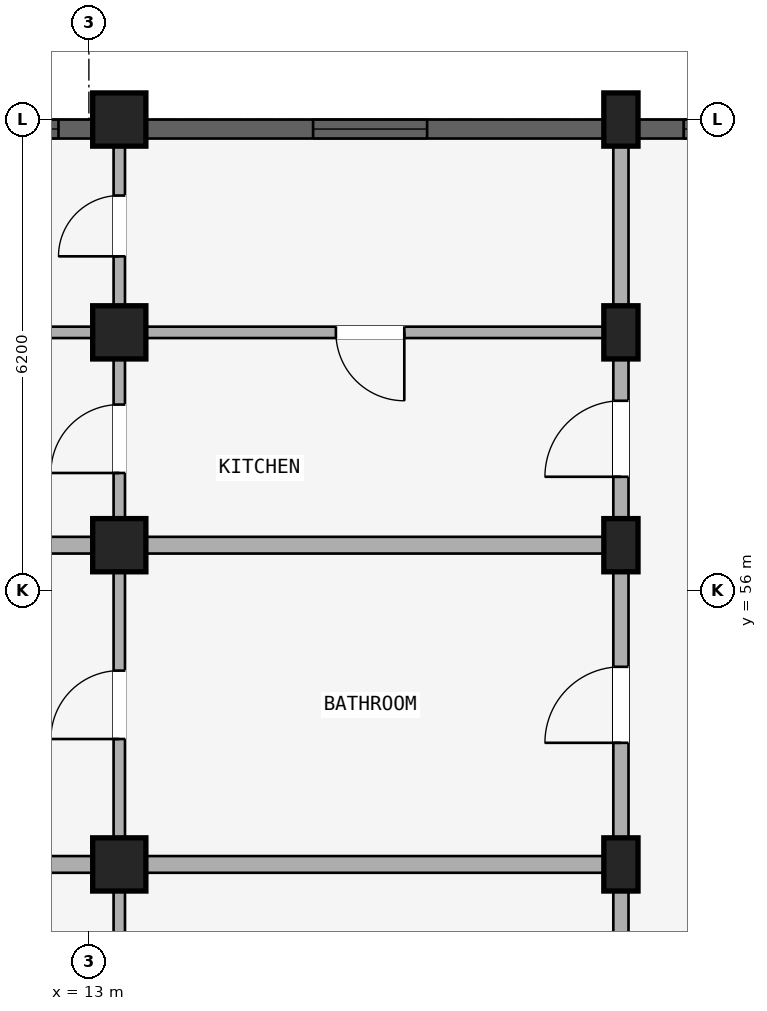
"""IFC4 building model, lengths in metres.
Left out: names, types, materials, properties, quantities, classifications, styles, units other than length and angle.
Written with IfcOpenShell. Run it as: python <this file> out.ifc"""

import sys

from ifc_helpers import new_model, si_unit, direction, frame, frame_2d, origin, origin_2d, place, context, subcontext, project, spatial, rectangle, extrude, element, fill, save


model = new_model("IFC4")
c1 = context("Model", 3, precision=1e-05, world=origin(), true_north=direction((0.0, 1.0)))
c2 = subcontext(c1, "Body", "Model", "MODEL_VIEW")
j1 = project(units=[si_unit("LENGTHUNIT", "METRE"), si_unit("PLANEANGLEUNIT", "RADIAN")], contexts=[c1])
p1 = place(None, origin())
s1 = spatial("IfcSite", under=j1, at=p1, CompositionType="ELEMENT")
p2 = place(p1, origin())
s2 = spatial("IfcBuilding", under=s1, at=p2, CompositionType="ELEMENT")
p3 = place(p2, frame((0.0, 0.0, 18.15)))
s3 = spatial("IfcBuildingStorey", under=s2, at=p3, CompositionType="ELEMENT", Elevation=18.15)
p4 = place(p3, frame((20.0, 52.4, 0.0), z_axis=(0.0, 0.0, 1.0), x_axis=(1.0, 0.0, 0.0)))
e1 = element("IfcColumn", 1, at=p4, inside=s3, PredefinedType="COLUMN", context=c2, shape_type="SweptSolid", body=[
    extrude(rectangle(XDim=0.45, YDim=0.7, at=origin_2d()), origin(), (0.0, 0.0, 1.0), 2.93),
])
p5 = place(p3, frame((13.4, 52.4, 0.0), z_axis=(0.0, 0.0, 1.0), x_axis=(1.0, 0.0, 0.0)))
e2 = element("IfcColumn", 2, at=p5, inside=s3, PredefinedType="COLUMN", context=c2, shape_type="SweptSolid", body=[
    extrude(rectangle(XDim=0.7, YDim=0.7, at=origin_2d()), origin(), (0.0, 0.0, 1.0), 2.93),
])
p6 = place(p3, frame((20.0, 56.6, 0.0), z_axis=(0.0, 0.0, 1.0), x_axis=(1.0, 0.0, 0.0)))
e3 = element("IfcColumn", 3, at=p6, inside=s3, PredefinedType="COLUMN", context=c2, shape_type="SweptSolid", body=[
    extrude(rectangle(XDim=0.45, YDim=0.7, at=origin_2d()), origin(), (0.0, 0.0, 1.0), 2.93),
])
p7 = place(p3, frame((13.4, 56.6, 0.0), z_axis=(0.0, 0.0, 1.0), x_axis=(1.0, 0.0, 0.0)))
e4 = element("IfcColumn", 4, at=p7, inside=s3, PredefinedType="COLUMN", context=c2, shape_type="SweptSolid", body=[
    extrude(rectangle(XDim=0.7, YDim=0.7, at=origin_2d()), origin(), (0.0, 0.0, 1.0), 2.93),
])
p8 = place(p3, frame((20.0, 59.4, 0.0), z_axis=(0.0, 0.0, 1.0), x_axis=(1.0, 0.0, 0.0)))
e5 = element("IfcColumn", 5, at=p8, inside=s3, PredefinedType="COLUMN", context=c2, shape_type="SweptSolid", body=[
    extrude(rectangle(XDim=0.45, YDim=0.7, at=origin_2d()), origin(), (0.0, 0.0, 1.0), 2.93),
])
p9 = place(p3, frame((13.4, 59.4, 0.0), z_axis=(0.0, 0.0, 1.0), x_axis=(1.0, 0.0, 0.0)))
e6 = element("IfcColumn", 6, at=p9, inside=s3, PredefinedType="COLUMN", context=c2, shape_type="SweptSolid", body=[
    extrude(rectangle(XDim=0.7, YDim=0.7, at=origin_2d()), origin(), (0.0, 0.0, 1.0), 2.93),
])
p10 = place(p3, frame((20.0, 62.2, 0.0), z_axis=(0.0, 0.0, 1.0), x_axis=(1.0, 0.0, 0.0)))
e7 = element("IfcColumn", 7, at=p10, inside=s3, PredefinedType="COLUMN", context=c2, shape_type="SweptSolid", body=[
    extrude(rectangle(XDim=0.45, YDim=0.7, at=origin_2d()), origin(), (0.0, 0.0, 1.0), 2.93),
])
p11 = place(p3, frame((13.4, 62.2, 0.0), z_axis=(0.0, 0.0, 1.0), x_axis=(1.0, 0.0, 0.0)))
e8 = element("IfcColumn", 8, at=p11, inside=s3, PredefinedType="COLUMN", context=c2, shape_type="SweptSolid", body=[
    extrude(rectangle(XDim=0.7, YDim=0.7, at=origin_2d()), origin(), (0.0, 0.0, 1.0), 2.93),
])
p12 = place(p3, frame((20.0, 48.35, 0.0), z_axis=(0.0, 0.0, 1.0), x_axis=(0.0, 1.0, 0.0)))
e9 = element("IfcWall", 9, at=p12, inside=s3, PredefinedType="STANDARD", context=c2, shape_type="SweptSolid", body=[
    extrude(rectangle(XDim=4.05, YDim=0.2, at=frame_2d((2.025, 0.0))), origin(), (0.0, 0.0, 1.0), 2.372),
])
p13 = place(p12, frame((1.525, 0.0, 0.0)))
e10 = element("IfcOpeningElement", 10, at=p13, cuts=e9, PredefinedType="OPENING", context=c2, shape_type="SweptSolid", body=[
    extrude(rectangle(XDim=1.0, YDim=2.15, at=frame_2d((0.5, 1.075))), frame((0.0, 0.11, 0.0), z_axis=(0.0, -1.0, 0.0), x_axis=(1.0, 0.0, 0.0)), (0.0, 0.0, 1.0), 0.22),
])
p14 = place(p3, frame((13.4, 48.43, 0.0), z_axis=(0.0, 0.0, 1.0), x_axis=(0.0, 1.0, 0.0)))
e11 = element("IfcWall", 11, at=p14, inside=s3, PredefinedType="PARTITIONING", context=c2, shape_type="SweptSolid", body=[
    extrude(rectangle(XDim=3.89, YDim=0.15, at=frame_2d((1.945, 0.0))), origin(), (0.0, 0.0, 1.0), 2.372),
])
p15 = place(p14, frame((1.495, 0.0, 0.0)))
e12 = element("IfcOpeningElement", 12, at=p15, cuts=e11, PredefinedType="OPENING", context=c2, shape_type="SweptSolid", body=[
    extrude(rectangle(XDim=0.9, YDim=2.1, at=frame_2d((0.45, 1.05))), frame((0.0, 0.085, 0.0), z_axis=(0.0, -1.0, 0.0), x_axis=(1.0, 0.0, 0.0)), (0.0, 0.0, 1.0), 0.17),
])
p16 = place(p3, frame((20.0, 52.4, 0.0), z_axis=(0.0, 0.0, 1.0), x_axis=(0.0, 1.0, 0.0)))
e13 = element("IfcWall", 13, at=p16, inside=s3, PredefinedType="STANDARD", context=c2, shape_type="SweptSolid", body=[
    extrude(rectangle(XDim=4.2, YDim=0.2, at=frame_2d((2.1, 0.0))), origin(), (0.0, 0.0, 1.0), 2.372),
])
p17 = place(p16, frame((1.6, 0.0, 0.0)))
e14 = element("IfcOpeningElement", 14, at=p17, cuts=e13, PredefinedType="OPENING", context=c2, shape_type="SweptSolid", body=[
    extrude(rectangle(XDim=1.0, YDim=2.15, at=frame_2d((0.5, 1.075))), frame((0.0, 0.11, 0.0), z_axis=(0.0, -1.0, 0.0), x_axis=(1.0, 0.0, 0.0)), (0.0, 0.0, 1.0), 0.22),
])
p18 = place(p3, frame((13.4, 52.48, 0.0), z_axis=(0.0, 0.0, 1.0), x_axis=(0.0, 1.0, 0.0)))
e15 = element("IfcWall", 15, at=p18, inside=s3, PredefinedType="PARTITIONING", context=c2, shape_type="SweptSolid", body=[
    extrude(rectangle(XDim=4.04, YDim=0.15, at=frame_2d((2.02, 0.0))), origin(), (0.0, 0.0, 1.0), 2.372),
])
p19 = place(p18, frame((1.57, 0.0, 0.0)))
e16 = element("IfcOpeningElement", 16, at=p19, cuts=e15, PredefinedType="OPENING", context=c2, shape_type="SweptSolid", body=[
    extrude(rectangle(XDim=0.9, YDim=2.1, at=frame_2d((0.45, 1.05))), frame((0.0, 0.085, 0.0), z_axis=(0.0, -1.0, 0.0), x_axis=(1.0, 0.0, 0.0)), (0.0, 0.0, 1.0), 0.17),
])
p20 = place(p3, frame((19.95, 52.4, 0.0), z_axis=(0.0, 0.0, 1.0), x_axis=(-1.0, 0.0, 0.0)))
e17 = element("IfcWall", 17, at=p20, inside=s3, PredefinedType="STANDARD", context=c2, shape_type="SweptSolid", body=[
    extrude(rectangle(XDim=17.53, YDim=0.22, at=frame_2d((8.765, 0.0))), origin(), (0.0, 0.0, 1.0), 2.372),
])
p21 = place(p3, frame((20.0, 56.6, 0.0), z_axis=(0.0, 0.0, 1.0), x_axis=(0.0, 1.0, 0.0)))
e18 = element("IfcWall", 18, at=p21, inside=s3, PredefinedType="STANDARD", context=c2, shape_type="SweptSolid", body=[
    extrude(rectangle(XDim=2.8, YDim=0.2, at=frame_2d((1.4, 0.0))), origin(), (0.0, 0.0, 1.0), 2.372),
])
p22 = place(p21, frame((0.9, 0.0, 0.0)))
e19 = element("IfcOpeningElement", 19, at=p22, cuts=e18, PredefinedType="OPENING", context=c2, shape_type="SweptSolid", body=[
    extrude(rectangle(XDim=1.0, YDim=2.15, at=frame_2d((0.5, 1.075))), frame((0.0, 0.11, 0.0), z_axis=(0.0, -1.0, 0.0), x_axis=(1.0, 0.0, 0.0)), (0.0, 0.0, 1.0), 0.22),
])
p23 = place(p3, frame((13.4, 56.68, 0.0), z_axis=(0.0, 0.0, 1.0), x_axis=(0.0, 1.0, 0.0)))
e20 = element("IfcWall", 20, at=p23, inside=s3, PredefinedType="PLUMBINGWALL", context=c2, shape_type="SweptSolid", body=[
    extrude(rectangle(XDim=2.64, YDim=0.15, at=frame_2d((1.32, 0.0))), origin(), (0.0, 0.0, 1.0), 2.372),
])
p24 = place(p23, frame((0.87, 0.0, 0.0)))
e21 = element("IfcOpeningElement", 21, at=p24, cuts=e20, PredefinedType="OPENING", context=c2, shape_type="SweptSolid", body=[
    extrude(rectangle(XDim=0.9, YDim=2.1, at=frame_2d((0.45, 1.05))), frame((0.0, 0.085, 0.0), z_axis=(0.0, -1.0, 0.0), x_axis=(1.0, 0.0, 0.0)), (0.0, 0.0, 1.0), 0.17),
])
p25 = place(p3, frame((19.9, 56.6, 0.0), z_axis=(0.0, 0.0, 1.0), x_axis=(-1.0, 0.0, 0.0)))
e22 = element("IfcWall", 22, at=p25, inside=s3, PredefinedType="STANDARD", context=c2, shape_type="SweptSolid", body=[
    extrude(rectangle(XDim=17.42, YDim=0.22, at=frame_2d((8.71, 0.0))), origin(), (0.0, 0.0, 1.0), 2.372),
])
p26 = place(p3, frame((20.0, 59.4, 0.0), z_axis=(0.0, 0.0, 1.0), x_axis=(0.0, 1.0, 0.0)))
e23 = element("IfcWall", 23, at=p26, inside=s3, PredefinedType="STANDARD", context=c2, shape_type="SweptSolid", body=[
    extrude(rectangle(XDim=2.8, YDim=0.2, at=frame_2d((1.4, 0.0))), origin(), (0.0, 0.0, 1.0), 2.372),
])
p27 = place(p3, frame((13.4, 59.48, 0.0), z_axis=(0.0, 0.0, 1.0), x_axis=(0.0, 1.0, 0.0)))
e24 = element("IfcWall", 24, at=p27, inside=s3, PredefinedType="PLUMBINGWALL", context=c2, shape_type="SweptSolid", body=[
    extrude(rectangle(XDim=2.64, YDim=0.15, at=frame_2d((1.32, 0.0))), origin(), (0.0, 0.0, 1.0), 2.372),
])
p28 = place(p27, frame((0.92, 0.0, 0.0)))
e25 = element("IfcOpeningElement", 25, at=p28, cuts=e24, PredefinedType="OPENING", context=c2, shape_type="SweptSolid", body=[
    extrude(rectangle(XDim=0.8, YDim=2.1, at=frame_2d((0.4, 1.05))), frame((0.0, 0.085, 0.0), z_axis=(0.0, -1.0, 0.0), x_axis=(1.0, 0.0, 0.0)), (0.0, 0.0, 1.0), 0.17),
])
p29 = place(p3, frame((19.9, 59.4, 0.0), z_axis=(0.0, 0.0, 1.0), x_axis=(-1.0, 0.0, 0.0)))
e26 = element("IfcWall", 26, at=p29, inside=s3, PredefinedType="PARTITIONING", context=c2, shape_type="SweptSolid", body=[
    extrude(rectangle(XDim=17.42, YDim=0.15, at=frame_2d((8.71, 0.0))), origin(), (0.0, 0.0, 1.0), 2.372),
])
p30 = place(p29, frame((2.75, 0.0, 0.0)))
e27 = element("IfcOpeningElement", 27, at=p30, cuts=e26, PredefinedType="OPENING", context=c2, shape_type="SweptSolid", body=[
    extrude(rectangle(XDim=0.9, YDim=2.1, at=frame_2d((0.45, 1.05))), frame((0.0, 0.085, 0.0), z_axis=(0.0, -1.0, 0.0), x_axis=(1.0, 0.0, 0.0)), (0.0, 0.0, 1.0), 0.17),
])
p31 = place(p3, frame((22.171, 62.075, 0.0), z_axis=(0.0, 0.0, 1.0), x_axis=(-1.0, 0.0, 0.0)))
e28 = element("IfcWall", 28, at=p31, inside=s3, PredefinedType="STANDARD", context=c2, shape_type="SweptSolid", body=[
    extrude(rectangle(XDim=1.943, YDim=0.25, at=frame_2d((0.971, 0.0))), origin(), (0.0, 0.0, 1.0), 2.372),
])
p32 = place(p31, frame((0.596, 0.0, 0.88)))
e29 = element("IfcOpeningElement", 29, at=p32, cuts=e28, PredefinedType="OPENING", context=c2, shape_type="SweptSolid", body=[
    extrude(rectangle(XDim=0.75, YDim=1.05, at=frame_2d((0.375, 0.525))), frame((0.0, 0.135, 0.0), z_axis=(0.0, -1.0, 0.0), x_axis=(1.0, 0.0, 0.0)), (0.0, 0.0, 1.0), 0.27),
])
p33 = place(p3, frame((19.771, 62.075, 0.0), z_axis=(0.0, 0.0, 1.0), x_axis=(-1.0, 0.0, 0.0)))
e30 = element("IfcWall", 30, at=p33, inside=s3, PredefinedType="STANDARD", context=c2, shape_type="SweptSolid", body=[
    extrude(rectangle(XDim=6.018, YDim=0.25, at=frame_2d((3.009, 0.0))), origin(), (0.0, 0.0, 1.0), 2.372),
])
p34 = place(p33, frame((2.322, 0.0, 0.522)))
e31 = element("IfcOpeningElement", 31, at=p34, cuts=e30, PredefinedType="OPENING", context=c2, shape_type="SweptSolid", body=[
    extrude(rectangle(XDim=1.5, YDim=1.65, at=frame_2d((0.75, 0.825))), frame((0.0, 0.135, 0.0), z_axis=(0.0, -1.0, 0.0), x_axis=(1.0, 0.0, 0.0)), (0.0, 0.0, 1.0), 0.27),
])
p35 = place(p3, frame((13.046, 62.075, 0.0), z_axis=(0.0, 0.0, 1.0), x_axis=(-1.0, 0.0, 0.0)))
e32 = element("IfcWall", 32, at=p35, inside=s3, PredefinedType="STANDARD", context=c2, shape_type="SweptSolid", body=[
    extrude(rectangle(XDim=2.093, YDim=0.25, at=frame_2d((1.046, 0.0))), origin(), (0.0, 0.0, 1.0), 2.372),
])
p36 = place(p35, frame((0.447, 0.0, 0.672)))
e33 = element("IfcOpeningElement", 33, at=p36, cuts=e32, PredefinedType="OPENING", context=c2, shape_type="SweptSolid", body=[
    extrude(rectangle(XDim=1.2, YDim=1.5, at=frame_2d((0.6, 0.75))), frame((0.0, 0.135, 0.0), z_axis=(0.0, -1.0, 0.0), x_axis=(1.0, 0.0, 0.0)), (0.0, 0.0, 1.0), 0.27),
])
p37 = place(p32, origin())
e34 = element("IfcWindow", 34, at=p37, inside=s3, PartitioningType="SINGLE_PANEL", PredefinedType="WINDOW", context=c2, shape_type="SweptSolid", body=[
    extrude(rectangle(XDim=0.75, YDim=1.05, at=frame_2d((0.375, 0.525))), frame((0.0, 0.03, 0.0), z_axis=(0.0, -1.0, 0.0), x_axis=(1.0, 0.0, 0.0)), (0.0, 0.0, 1.0), 0.06),
])
fill(e29, e34)
p38 = place(p34, origin())
e35 = element("IfcWindow", 35, at=p38, inside=s3, PartitioningType="DOUBLE_PANEL_VERTICAL", PredefinedType="WINDOW", context=c2, shape_type="SweptSolid", body=[
    extrude(rectangle(XDim=1.5, YDim=1.65, at=frame_2d((0.75, 0.825))), frame((0.0, 0.03, 0.0), z_axis=(0.0, -1.0, 0.0), x_axis=(1.0, 0.0, 0.0)), (0.0, 0.0, 1.0), 0.06),
])
fill(e31, e35)
p39 = place(p36, origin())
e36 = element("IfcWindow", 36, at=p39, inside=s3, PartitioningType="SINGLE_PANEL", PredefinedType="WINDOW", context=c2, shape_type="SweptSolid", body=[
    extrude(rectangle(XDim=1.2, YDim=1.5, at=frame_2d((0.6, 0.75))), frame((0.0, 0.03, 0.0), z_axis=(0.0, -1.0, 0.0), x_axis=(1.0, 0.0, 0.0)), (0.0, 0.0, 1.0), 0.06),
])
fill(e33, e36)
p40 = place(p17, frame((1.0, 0.0, 0.0), z_axis=(0.0, 0.0, 1.0), x_axis=(-1.0, 0.0, 0.0)))
e37 = element("IfcDoor", 37, at=p40, inside=s3, OperationType="SINGLE_SWING_RIGHT", PredefinedType="DOOR", context=c2, shape_type="SweptSolid", body=[
    extrude(rectangle(XDim=1.0, YDim=2.15, at=frame_2d((0.5, 1.075))), frame((0.0, 0.025, 0.0), z_axis=(0.0, -1.0, 0.0), x_axis=(1.0, 0.0, 0.0)), (0.0, 0.0, 1.0), 0.05),
])
fill(e14, e37)
p41 = place(p19, origin())
e38 = element("IfcDoor", 38, at=p41, inside=s3, OperationType="SINGLE_SWING_LEFT", PredefinedType="DOOR", context=c2, shape_type="SweptSolid", body=[
    extrude(rectangle(XDim=0.9, YDim=2.1, at=frame_2d((0.45, 1.05))), frame((0.0, 0.025, 0.0), z_axis=(0.0, -1.0, 0.0), x_axis=(1.0, 0.0, 0.0)), (0.0, 0.0, 1.0), 0.05),
])
fill(e16, e38)
p42 = place(p24, origin())
e39 = element("IfcDoor", 39, at=p42, inside=s3, OperationType="SINGLE_SWING_LEFT", PredefinedType="DOOR", context=c2, shape_type="SweptSolid", body=[
    extrude(rectangle(XDim=0.9, YDim=2.1, at=frame_2d((0.45, 1.05))), frame((0.0, 0.025, 0.0), z_axis=(0.0, -1.0, 0.0), x_axis=(1.0, 0.0, 0.0)), (0.0, 0.0, 1.0), 0.05),
])
fill(e21, e39)
p43 = place(p22, frame((1.0, 0.0, 0.0), z_axis=(0.0, 0.0, 1.0), x_axis=(-1.0, 0.0, 0.0)))
e40 = element("IfcDoor", 40, at=p43, inside=s3, OperationType="SINGLE_SWING_RIGHT", PredefinedType="DOOR", context=c2, shape_type="SweptSolid", body=[
    extrude(rectangle(XDim=1.0, YDim=2.15, at=frame_2d((0.5, 1.075))), frame((0.0, 0.025, 0.0), z_axis=(0.0, -1.0, 0.0), x_axis=(1.0, 0.0, 0.0)), (0.0, 0.0, 1.0), 0.05),
])
fill(e19, e40)
p44 = place(p28, origin())
e41 = element("IfcDoor", 41, at=p44, inside=s3, OperationType="SINGLE_SWING_LEFT", PredefinedType="DOOR", context=c2, shape_type="SweptSolid", body=[
    extrude(rectangle(XDim=0.8, YDim=2.1, at=frame_2d((0.4, 1.05))), frame((0.0, 0.025, 0.0), z_axis=(0.0, -1.0, 0.0), x_axis=(1.0, 0.0, 0.0)), (0.0, 0.0, 1.0), 0.05),
])
fill(e25, e41)
p45 = place(p30, origin())
e42 = element("IfcDoor", 42, at=p45, inside=s3, OperationType="SINGLE_SWING_LEFT", PredefinedType="DOOR", context=c2, shape_type="SweptSolid", body=[
    extrude(rectangle(XDim=0.9, YDim=2.1, at=frame_2d((0.45, 1.05))), frame((0.0, 0.025, 0.0), z_axis=(0.0, -1.0, 0.0), x_axis=(1.0, 0.0, 0.0)), (0.0, 0.0, 1.0), 0.05),
])
fill(e27, e42)
save(model, sys.argv[1])
